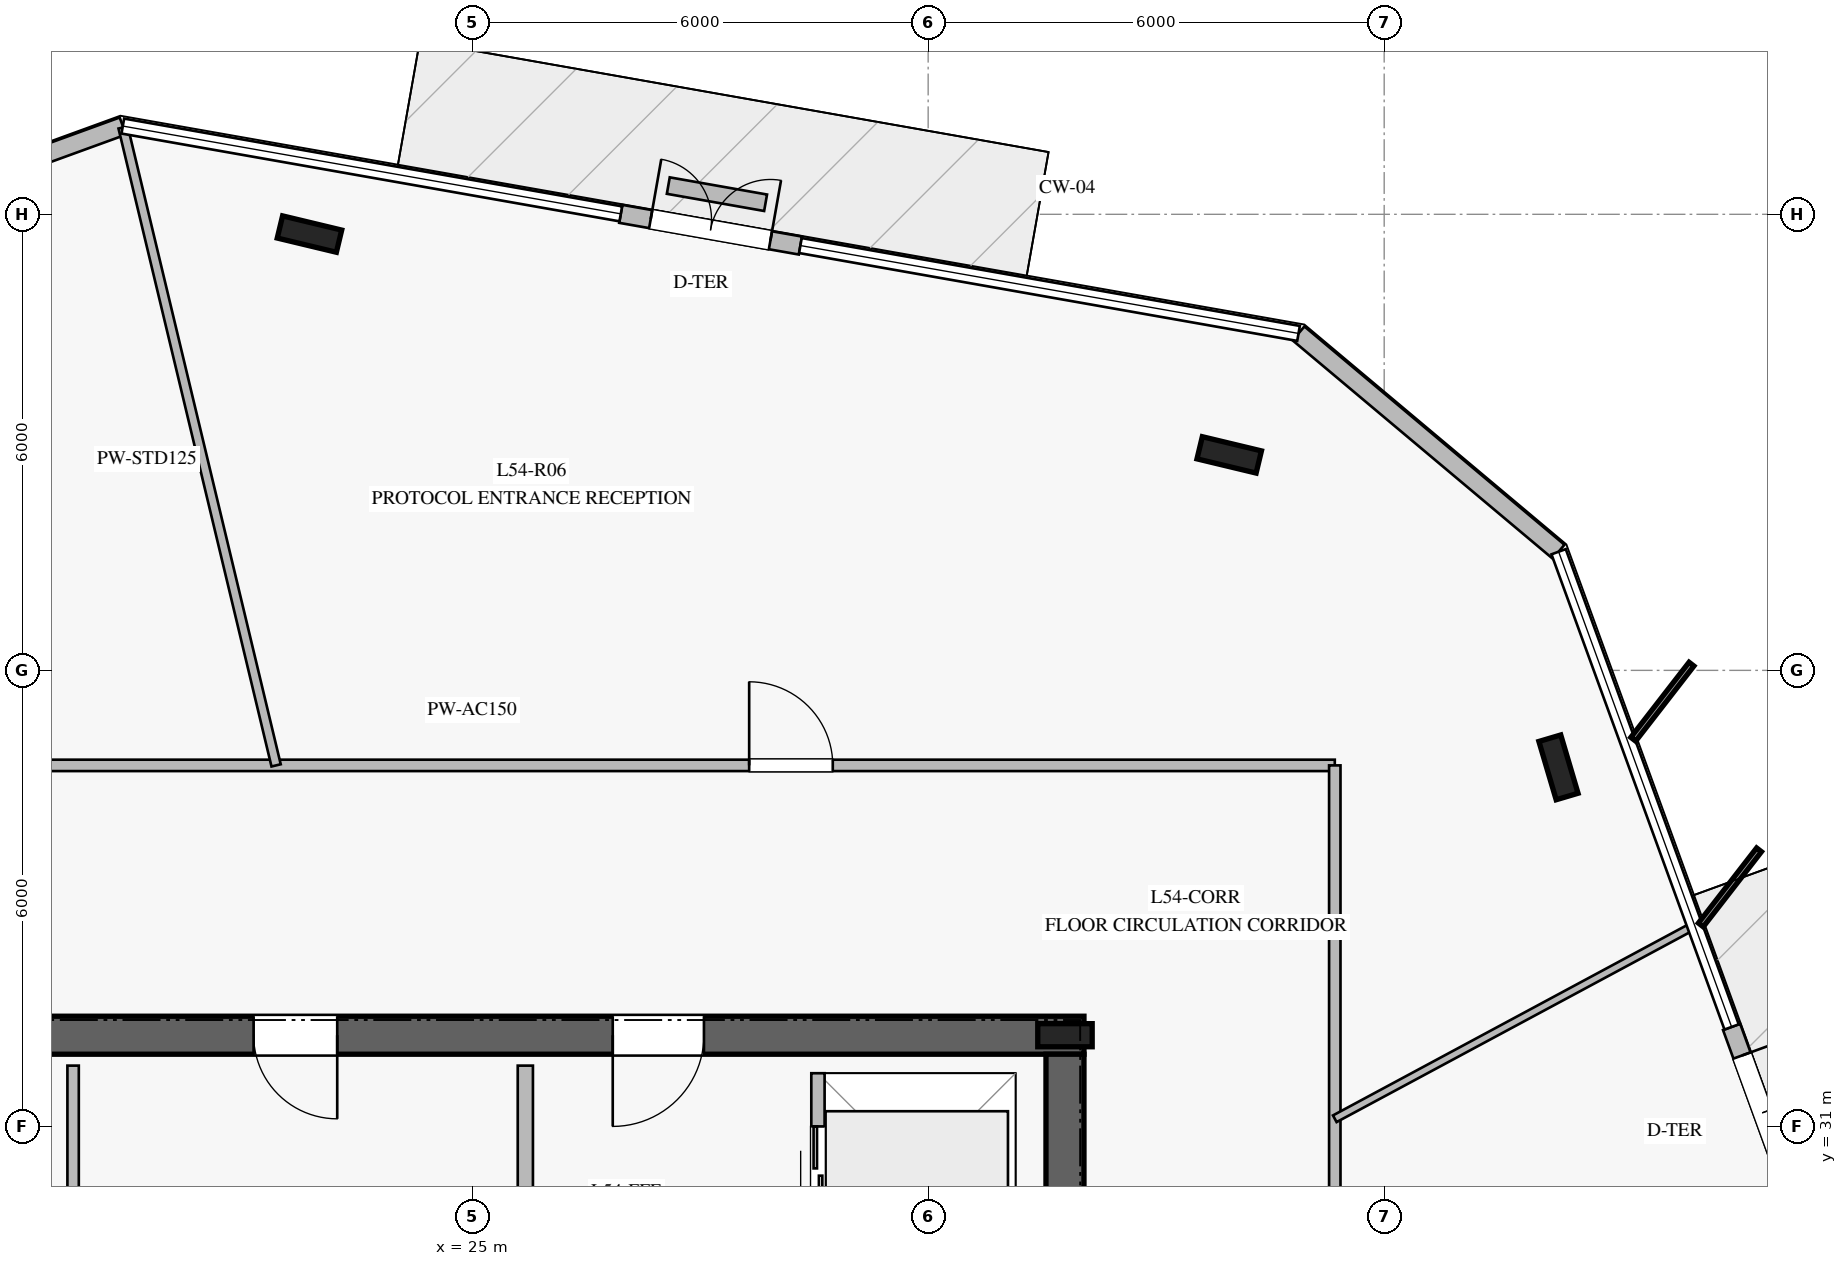
"""IFC4 building model, lengths in metres.
Left out: names, types, materials, properties, quantities, classifications, styles, units other than length and angle.
Written with IfcOpenShell. Run it as: python <this file> out.ifc"""

import sys

from ifc_helpers import new_model, si_unit, direction, frame, frame_2d, origin, origin_2d, place, context, subcontext, project, spatial, rectangle, i_section, extrude, element, fill, save


model = new_model("IFC4")
c1 = context("Model", 3, precision=1e-05, world=origin(), true_north=direction((0.0, 1.0)))
c2 = subcontext(c1, "Body", "Model", "MODEL_VIEW")
j1 = project(units=[si_unit("LENGTHUNIT", "METRE"), si_unit("PLANEANGLEUNIT", "RADIAN")], contexts=[c1])
p1 = place(None, origin())
s1 = spatial("IfcSite", under=j1, at=p1, CompositionType="ELEMENT")
p2 = place(p1, origin())
s2 = spatial("IfcBuilding", under=s1, at=p2, CompositionType="ELEMENT")
p3 = place(p2, frame((0.0, 0.0, 224.8)))
s3 = spatial("IfcBuildingStorey", under=s2, at=p3, CompositionType="ELEMENT", Elevation=224.8)
p4 = place(p3, frame((33.05, 32.2, 0.0), z_axis=(0.0, 0.0, 1.0), x_axis=(-1.0, 0.0, 0.0)))
e1 = element("IfcWall", 1, at=p4, inside=s3, PredefinedType="SHEAR", context=c2, shape_type="SweptSolid", body=[
    extrude(rectangle(XDim=16.1, YDim=0.5, at=frame_2d((8.05, 0.0))), origin(), (0.0, 0.0, 1.0), 3.78),
])
p5 = place(p4, frame((5.0, 0.0, 0.0)))
e2 = element("IfcOpeningElement", 2, at=p5, cuts=e1, PredefinedType="OPENING", context=c2, shape_type="SweptSolid", body=[
    extrude(rectangle(XDim=1.2, YDim=2.25, at=frame_2d((0.6, 1.125))), frame((0.0, 0.26, 0.0), z_axis=(0.0, -1.0, 0.0), x_axis=(1.0, 0.0, 0.0)), (0.0, 0.0, 1.0), 0.52),
])
p6 = place(p4, frame((9.825, 0.0, 0.0)))
e3 = element("IfcOpeningElement", 3, at=p6, cuts=e1, PredefinedType="OPENING", context=c2, shape_type="SweptSolid", body=[
    extrude(rectangle(XDim=1.1, YDim=2.2, at=frame_2d((0.55, 1.1))), frame((0.0, 0.26, 0.0), z_axis=(0.0, -1.0, 0.0), x_axis=(1.0, 0.0, 0.0)), (0.0, 0.0, 1.0), 0.52),
])
p7 = place(p3, frame((32.8, 18.05, 0.0), z_axis=(0.0, 0.0, 1.0), x_axis=(0.0, 1.0, 0.0)))
e4 = element("IfcWall", 4, at=p7, inside=s3, PredefinedType="SHEAR", context=c2, shape_type="SweptSolid", body=[
    extrude(rectangle(XDim=13.9, YDim=0.5, at=frame_2d((6.95, 0.0))), origin(), (0.0, 0.0, 1.0), 3.78),
])
p8 = place(p3, frame((32.8, 32.2, 0.0), z_axis=(0.0, 0.0, 1.0), x_axis=(1.0, 0.0, 0.0)))
e5 = element("IfcColumn", 5, at=p8, inside=s3, PredefinedType="COLUMN", context=c2, shape_type="SweptSolid", body=[
    extrude(i_section(OverallWidth=0.304, OverallDepth=0.716, WebThickness=0.021, FlangeThickness=0.04, at=origin_2d()), origin(), (0.0, 0.0, 1.0), 4.0),
])
for number, where, z_axis, x_axis in (
    (6, (34.961, 39.835, 0.0), (0.0, 0.0, 1.0), (-0.972, 0.233, 0.0)),
    (7, (22.86, 42.74, 0.0), (0.0, 0.0, 1.0), (-0.972, 0.233, 0.0)),
    (8, (39.293, 35.724, 0.0), (0.0, 0.0, 1.0), (-0.284, 0.959, 0.0)),
):
    element("IfcColumn", number, at=place(p3, frame(where, z_axis=z_axis, x_axis=x_axis)), inside=s3, PredefinedType="COLUMN", context=c2, shape_type="SweptSolid", body=[
        extrude(i_section(OverallWidth=0.3, OverallDepth=0.8, WebThickness=0.018, FlangeThickness=0.033, at=origin_2d()), origin(), (0.0, 0.0, 1.0), 4.0),
    ])
p9 = place(p3, frame((29.319, 42.589, 0.0), z_axis=(0.0, 0.0, 1.0), x_axis=(-0.984784583074, 0.173779529692, 0.0)))
e9 = element("IfcWall", 9, at=p9, inside=s3, PredefinedType="STANDARD", context=c2, shape_type="SweptSolid", body=[
    extrude(rectangle(XDim=2.4, YDim=0.24, at=frame_2d((1.2, 0.0))), origin(), (0.0, 0.0, 1.0), 3.78),
])
p10 = place(p9, frame((0.4, 0.0, 0.0)))
e10 = element("IfcOpeningElement", 10, at=p10, cuts=e9, PredefinedType="OPENING", context=c2, shape_type="SweptSolid", body=[
    extrude(rectangle(XDim=1.6, YDim=2.25, at=frame_2d((0.8, 1.125))), frame((0.0, 0.13, 0.0), z_axis=(0.0, -1.0, 0.0), x_axis=(1.0, 0.0, 0.0)), (0.0, 0.0, 1.0), 0.26),
])
p11 = place(p3, frame((20.404, 44.161, 0.0), z_axis=(0.0, 0.0, 1.0), x_axis=(-0.939751947736, -0.341857099862, 0.0)))
e11 = element("IfcWall", 11, at=p11, inside=s3, PredefinedType="STANDARD", context=c2, shape_type="SweptSolid", body=[
    extrude(rectangle(XDim=4.469, YDim=0.24, at=frame_2d((2.235, 0.0))), origin(), (0.0, 0.0, 1.0), 3.78),
])
p12 = place(p3, frame((42.392, 30.054, 0.0), z_axis=(0.0, 0.0, 1.0), x_axis=(-0.342110593602, 0.939659694648, 0.0)))
e12 = element("IfcWall", 12, at=p12, inside=s3, PredefinedType="STANDARD", context=c2, shape_type="SweptSolid", body=[
    extrude(rectangle(XDim=2.4, YDim=0.24, at=frame_2d((1.2, 0.0))), origin(), (0.0, 0.0, 1.0), 3.78),
])
p13 = place(p12, frame((0.4, 0.0, 0.0)))
e13 = element("IfcOpeningElement", 13, at=p13, cuts=e12, PredefinedType="OPENING", context=c2, shape_type="SweptSolid", body=[
    extrude(rectangle(XDim=1.6, YDim=2.25, at=frame_2d((0.8, 1.125))), frame((0.0, 0.13, 0.0), z_axis=(0.0, -1.0, 0.0), x_axis=(1.0, 0.0, 0.0)), (0.0, 0.0, 1.0), 0.26),
])
p14 = place(p3, frame((39.295, 38.561, 0.0), z_axis=(0.0, 0.0, 1.0), x_axis=(-0.765958876261, 0.642889570515, 0.0)))
e14 = element("IfcWall", 14, at=p14, inside=s3, PredefinedType="STANDARD", context=c2, shape_type="SweptSolid", body=[
    extrude(rectangle(XDim=4.468, YDim=0.24, at=frame_2d((2.234, 0.0))), origin(), (0.0, 0.0, 1.0), 3.78),
])
p15 = place(p3, frame((28.861, 43.152, 0.0), z_axis=(0.0, 0.0, 1.0), x_axis=(-0.984791121497, 0.173742473276, 0.0)))
e15 = element("IfcWall", 15, at=p15, inside=s3, PredefinedType="USERDEFINED", context=c2, shape_type="SweptSolid", body=[
    extrude(rectangle(XDim=1.3, YDim=0.22, at=frame_2d((0.65, 0.0))), origin(), (0.0, 0.0, 1.0), 0.4),
])
p16 = place(p3, frame((25.7, 26.65, 0.0), z_axis=(0.0, 0.0, 1.0), x_axis=(0.0, 1.0, 0.0)))
e16 = element("IfcWall", 16, at=p16, inside=s3, PredefinedType="PARTITIONING", context=c2, shape_type="SweptSolid", body=[
    extrude(rectangle(XDim=5.15, YDim=0.2, at=frame_2d((2.575, 0.0))), origin(), (0.0, 0.0, 1.0), 3.78),
])
p17 = place(p3, frame((19.75, 29.39, 0.0), z_axis=(0.0, 0.0, 1.0), x_axis=(0.0, 1.0, 0.0)))
e17 = element("IfcWall", 17, at=p17, inside=s3, PredefinedType="PARTITIONING", context=c2, shape_type="SweptSolid", body=[
    extrude(rectangle(XDim=2.41, YDim=0.15, at=frame_2d((1.205, 0.0))), origin(), (0.0, 0.0, 1.0), 3.78),
])
p18 = place(p3, frame((29.55, 29.1, 0.0), z_axis=(0.0, 0.0, 1.0), x_axis=(0.0, 1.0, 0.0)))
e18 = element("IfcWall", 18, at=p18, inside=s3, PredefinedType="PARTITIONING", context=c2, shape_type="SweptSolid", body=[
    extrude(rectangle(XDim=2.6, YDim=0.175, at=frame_2d((1.3, 0.0))), origin(), (0.0, 0.0, 1.0), 3.78),
])
p19 = place(p18, frame((0.7, 0.0, 0.0)))
e19 = element("IfcOpeningElement", 19, at=p19, cuts=e18, PredefinedType="OPENING", context=c2, shape_type="SweptSolid", body=[
    extrude(rectangle(XDim=1.2, YDim=2.2, at=frame_2d((0.6, 1.1))), frame((0.0, 0.098, 0.0), z_axis=(0.0, -1.0, 0.0), x_axis=(1.0, 0.0, 0.0)), (0.0, 0.0, 1.0), 0.195),
])
p20 = place(p3, frame((13.65, 35.75, 0.0), z_axis=(0.0, 0.0, 1.0), x_axis=(1.0, 0.0, 0.0)))
e20 = element("IfcWall", 20, at=p20, inside=s3, PredefinedType="PARTITIONING", context=c2, shape_type="SweptSolid", body=[
    extrude(rectangle(XDim=22.7, YDim=0.15, at=frame_2d((11.35, 0.0))), origin(), (0.0, 0.0, 1.0), 3.05),
])
p21 = place(p20, frame((14.995, 0.0, 0.0)))
e21 = element("IfcOpeningElement", 21, at=p21, cuts=e20, PredefinedType="OPENING", context=c2, shape_type="SweptSolid", body=[
    extrude(rectangle(XDim=1.1, YDim=2.2, at=frame_2d((0.55, 1.1))), frame((0.0, 0.085, 0.0), z_axis=(0.0, -1.0, 0.0), x_axis=(1.0, 0.0, 0.0)), (0.0, 0.0, 1.0), 0.17),
])
p22 = place(p20, frame((3.921, 0.0, 0.0)))
e22 = element("IfcOpeningElement", 22, at=p22, cuts=e20, PredefinedType="OPENING", context=c2, shape_type="SweptSolid", body=[
    extrude(rectangle(XDim=1.1, YDim=2.2, at=frame_2d((0.55, 1.1))), frame((0.0, 0.085, 0.0), z_axis=(0.0, -1.0, 0.0), x_axis=(1.0, 0.0, 0.0)), (0.0, 0.0, 1.0), 0.17),
])
p23 = place(p3, frame((36.35, 35.75, 0.0), z_axis=(0.0, 0.0, 1.0), x_axis=(0.0, -1.0, 0.0)))
e23 = element("IfcWall", 23, at=p23, inside=s3, PredefinedType="PARTITIONING", context=c2, shape_type="SweptSolid", body=[
    extrude(rectangle(XDim=21.5, YDim=0.15, at=frame_2d((10.75, 0.0))), origin(), (0.0, 0.0, 1.0), 3.28),
])
p24 = place(p23, frame((18.84, 0.0, 0.0)))
e24 = element("IfcOpeningElement", 24, at=p24, cuts=e23, PredefinedType="OPENING", context=c2, shape_type="SweptSolid", body=[
    extrude(rectangle(XDim=1.1, YDim=2.2, at=frame_2d((0.55, 1.1))), frame((0.0, 0.085, 0.0), z_axis=(0.0, -1.0, 0.0), x_axis=(1.0, 0.0, 0.0)), (0.0, 0.0, 1.0), 0.17),
])
p25 = place(p23, frame((10.665, 0.0, 0.0)))
e25 = element("IfcOpeningElement", 25, at=p25, cuts=e23, PredefinedType="OPENING", context=c2, shape_type="SweptSolid", body=[
    extrude(rectangle(XDim=1.1, YDim=2.2, at=frame_2d((0.55, 1.1))), frame((0.0, 0.085, 0.0), z_axis=(0.0, -1.0, 0.0), x_axis=(1.0, 0.0, 0.0)), (0.0, 0.0, 1.0), 0.17),
])
p26 = place(p3, frame((22.421, 35.75, 0.0), z_axis=(0.0, 0.0, 1.0), x_axis=(-0.233219964305, 0.972424006414, 0.0)))
e26 = element("IfcWall", 26, at=p26, inside=s3, PredefinedType="PARTITIONING", context=c2, shape_type="SweptSolid", body=[
    extrude(rectangle(XDim=8.631, YDim=0.125, at=frame_2d((4.315, 0.0))), origin(), (0.0, 0.0, 1.0), 3.05),
])
p27 = place(p3, frame((36.35, 31.101, 0.0), z_axis=(0.0, 0.0, 1.0), x_axis=(0.880833659308, 0.473425880819, 0.0)))
e27 = element("IfcWall", 27, at=p27, inside=s3, PredefinedType="MOVABLE", context=c2, shape_type="SweptSolid", body=[
    extrude(rectangle(XDim=5.359, YDim=0.1, at=frame_2d((2.679, 0.0))), origin(), (0.0, 0.0, 1.0), 3.18),
])
p28 = place(p10, frame((1.6, 0.0, 0.0), z_axis=(0.0, 0.0, 1.0), x_axis=(-1.0, 0.0, 0.0)))
e28 = element("IfcDoor", 28, at=p28, inside=s3, OperationType="DOUBLE_DOOR_SINGLE_SWING", PredefinedType="DOOR", context=c2, shape_type="SweptSolid", body=[
    extrude(rectangle(XDim=1.6, YDim=2.25, at=frame_2d((0.8, 1.125))), frame((0.0, 0.025, 0.0), z_axis=(0.0, -1.0, 0.0), x_axis=(1.0, 0.0, 0.0)), (0.0, 0.0, 1.0), 0.05),
])
fill(e10, e28)
p29 = place(p13, frame((1.6, 0.0, 0.0), z_axis=(0.0, 0.0, 1.0), x_axis=(-1.0, 0.0, 0.0)))
e29 = element("IfcDoor", 29, at=p29, inside=s3, OperationType="DOUBLE_DOOR_SINGLE_SWING", PredefinedType="DOOR", context=c2, shape_type="SweptSolid", body=[
    extrude(rectangle(XDim=1.6, YDim=2.25, at=frame_2d((0.8, 1.125))), frame((0.0, 0.025, 0.0), z_axis=(0.0, -1.0, 0.0), x_axis=(1.0, 0.0, 0.0)), (0.0, 0.0, 1.0), 0.05),
])
fill(e13, e29)
p30 = place(p5, origin())
e30 = element("IfcDoor", 30, at=p30, inside=s3, OperationType="SINGLE_SWING_RIGHT", PredefinedType="DOOR", context=c2, shape_type="SweptSolid", body=[
    extrude(rectangle(XDim=1.2, YDim=2.25, at=frame_2d((0.6, 1.125))), frame((0.0, 0.025, 0.0), z_axis=(0.0, -1.0, 0.0), x_axis=(1.0, 0.0, 0.0)), (0.0, 0.0, 1.0), 0.05),
])
fill(e2, e30)
p31 = place(p6, origin())
e31 = element("IfcDoor", 31, at=p31, inside=s3, OperationType="SINGLE_SWING_LEFT", PredefinedType="DOOR", context=c2, shape_type="SweptSolid", body=[
    extrude(rectangle(XDim=1.1, YDim=2.2, at=frame_2d((0.55, 1.1))), frame((0.0, 0.025, 0.0), z_axis=(0.0, -1.0, 0.0), x_axis=(1.0, 0.0, 0.0)), (0.0, 0.0, 1.0), 0.05),
])
fill(e3, e31)
p32 = place(p19, origin())
e32 = element("IfcDoor", 32, at=p32, inside=s3, OperationType="DOUBLE_DOOR_SLIDING", PredefinedType="DOOR", context=c2, shape_type="SweptSolid", body=[
    extrude(rectangle(XDim=1.2, YDim=2.2, at=frame_2d((0.6, 1.1))), frame((0.0, 0.025, 0.0), z_axis=(0.0, -1.0, 0.0), x_axis=(1.0, 0.0, 0.0)), (0.0, 0.0, 1.0), 0.05),
])
fill(e19, e32)
p33 = place(p21, origin())
e33 = element("IfcDoor", 33, at=p33, inside=s3, OperationType="SINGLE_SWING_LEFT", PredefinedType="DOOR", context=c2, shape_type="SweptSolid", body=[
    extrude(rectangle(XDim=1.1, YDim=2.2, at=frame_2d((0.55, 1.1))), frame((0.0, 0.025, 0.0), z_axis=(0.0, -1.0, 0.0), x_axis=(1.0, 0.0, 0.0)), (0.0, 0.0, 1.0), 0.05),
])
fill(e21, e33)
save(model, sys.argv[1])
